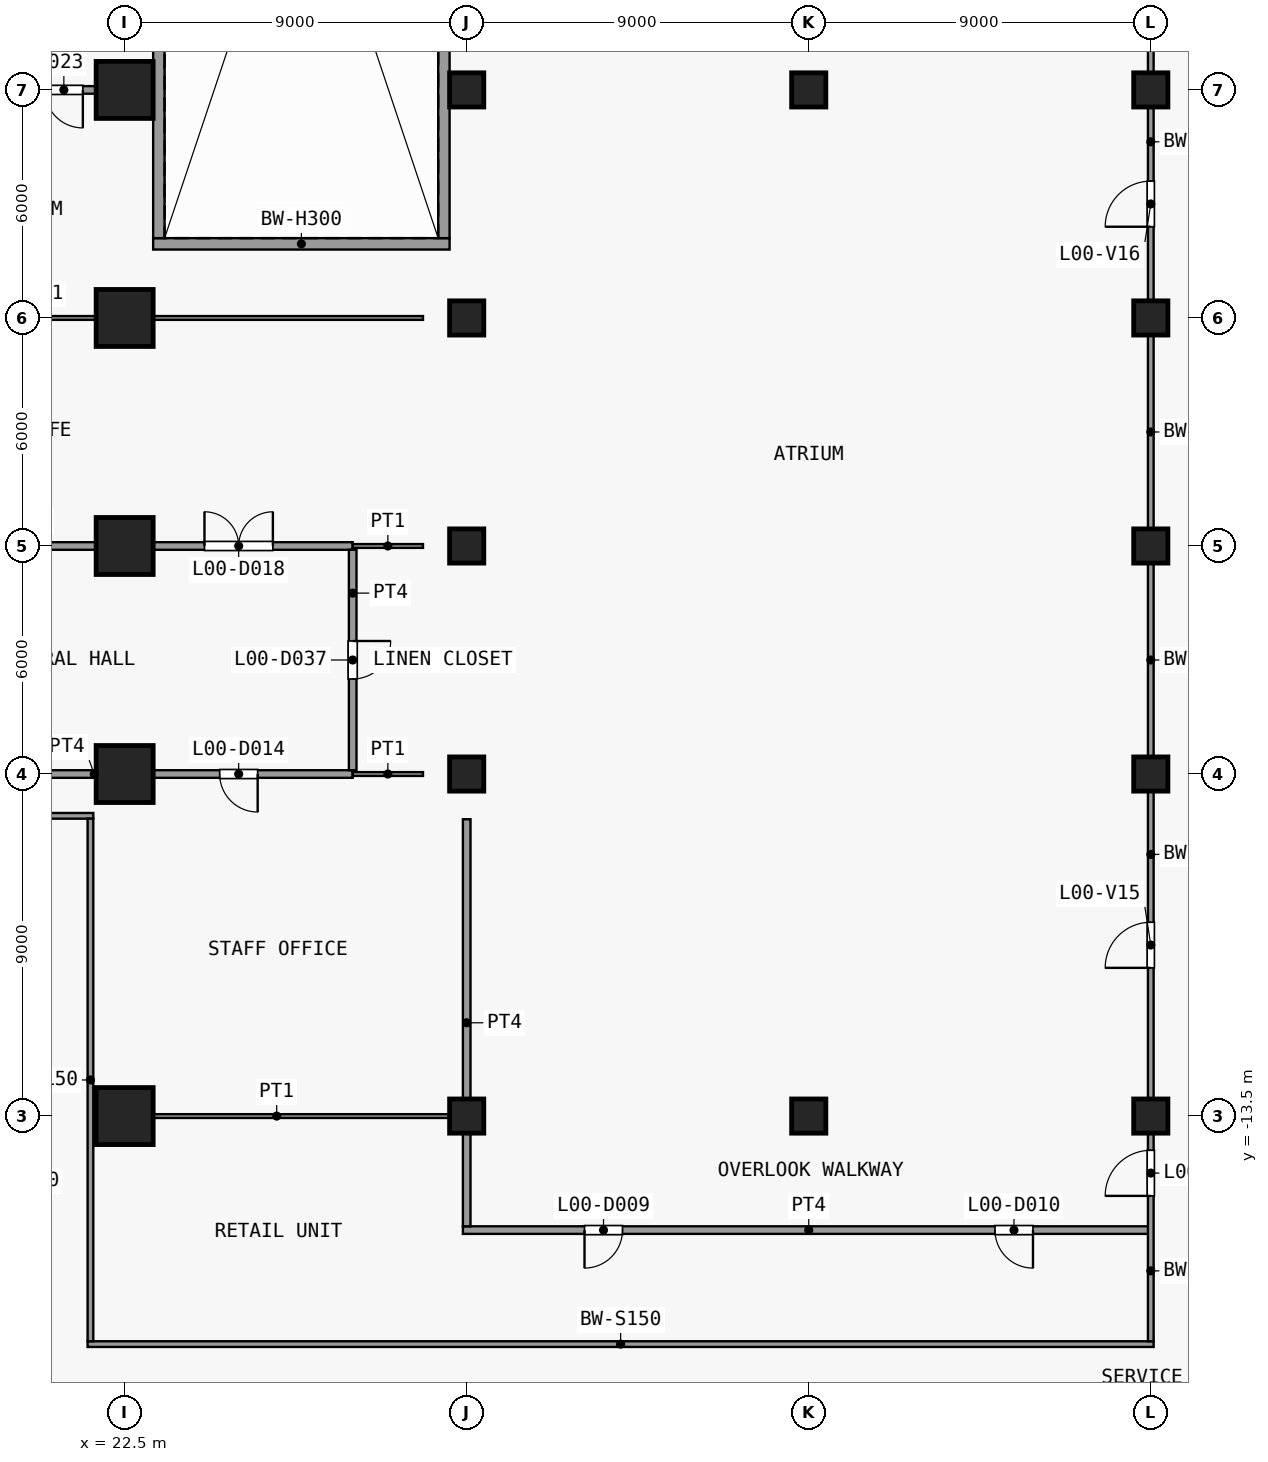
"""IFC4 building model, lengths in metres.
Left out: names, types, materials, properties, quantities, classifications, styles, units other than length and angle.
Written with IfcOpenShell. Run it as: python <this file> out.ifc"""

import sys

from ifc_helpers import new_model, si_unit, direction, frame, frame_2d, origin, origin_2d, place, context, subcontext, project, spatial, rectangle, extrude, element, fill, save


model = new_model("IFC4")
c1 = context("Model", 3, precision=1e-05, world=origin(), true_north=direction((0.0, 1.0)))
c2 = subcontext(c1, "Body", "Model", "MODEL_VIEW")
j1 = project(units=[si_unit("LENGTHUNIT", "METRE"), si_unit("PLANEANGLEUNIT", "RADIAN")], contexts=[c1])
p1 = place(None, origin())
s1 = spatial("IfcSite", under=j1, at=p1, CompositionType="ELEMENT")
p2 = place(p1, origin())
s2 = spatial("IfcBuilding", under=s1, at=p2, CompositionType="ELEMENT")
p3 = place(p2, origin())
s3 = spatial("IfcBuildingStorey", under=s2, at=p3, CompositionType="ELEMENT", Elevation=0.0)
for number, where, z_axis, x_axis in (
    (1, (22.5, -13.5, 0.0), (0.0, 0.0, 1.0), (1.0, 0.0, 0.0)),
    (2, (22.5, -4.5, 0.0), (0.0, 0.0, 1.0), (1.0, 0.0, 0.0)),
    (3, (22.5, 1.5, 0.0), (0.0, 0.0, 1.0), (1.0, 0.0, 0.0)),
    (4, (22.5, 7.5, 0.0), (0.0, 0.0, 1.0), (1.0, 0.0, 0.0)),
    (5, (22.5, 13.5, 0.0), (0.0, 0.0, 1.0), (1.0, 0.0, 0.0)),
):
    element("IfcColumn", number, at=place(p3, frame(where, z_axis=z_axis, x_axis=x_axis)), inside=s3, PredefinedType="COLUMN", context=c2, shape_type="SweptSolid", body=[
        extrude(rectangle(XDim=1.5, YDim=1.5, at=origin_2d()), origin(), (0.0, 0.0, 1.0), 8.0),
    ])
for number, where, z_axis, x_axis in (
    (6, (31.5, -13.5, 0.0), (0.0, 0.0, 1.0), (1.0, 0.0, 0.0)),
    (7, (31.5, -4.5, 0.0), (0.0, 0.0, 1.0), (1.0, 0.0, 0.0)),
    (8, (31.5, 1.5, 0.0), (0.0, 0.0, 1.0), (1.0, 0.0, 0.0)),
    (9, (31.5, 7.5, 0.0), (0.0, 0.0, 1.0), (1.0, 0.0, 0.0)),
    (10, (31.5, 13.5, 0.0), (0.0, 0.0, 1.0), (1.0, 0.0, 0.0)),
    (11, (40.5, -13.5, 0.0), (0.0, 0.0, 1.0), (1.0, 0.0, 0.0)),
    (12, (40.5, 13.5, 0.0), (0.0, 0.0, 1.0), (1.0, 0.0, 0.0)),
    (13, (49.5, -13.5, 0.0), (0.0, 0.0, 1.0), (1.0, 0.0, 0.0)),
    (14, (49.5, -4.5, 0.0), (0.0, 0.0, 1.0), (1.0, 0.0, 0.0)),
    (15, (49.5, 1.5, 0.0), (0.0, 0.0, 1.0), (1.0, 0.0, 0.0)),
    (16, (49.5, 7.5, 0.0), (0.0, 0.0, 1.0), (1.0, 0.0, 0.0)),
    (17, (49.5, 13.5, 0.0), (0.0, 0.0, 1.0), (1.0, 0.0, 0.0)),
):
    element("IfcColumn", number, at=place(p3, frame(where, z_axis=z_axis, x_axis=x_axis)), inside=s3, PredefinedType="COLUMN", context=c2, shape_type="SweptSolid", body=[
        extrude(rectangle(XDim=0.9, YDim=0.9, at=origin_2d()), origin(), (0.0, 0.0, 1.0), 8.0),
    ])
p4 = place(p3, frame((21.525, -19.5, 0.0), z_axis=(0.0, 0.0, 1.0), x_axis=(1.0, 0.0, 0.0)))
e18 = element("IfcWall", 18, at=p4, inside=s3, PredefinedType="PARTITIONING", context=c2, shape_type="SweptSolid", body=[
    extrude(rectangle(XDim=28.05, YDim=0.15, at=frame_2d((14.025, 0.0))), origin(), (0.0, 0.0, 1.0), 7.65),
])
p5 = place(p3, frame((3.825, -5.6, 0.0), z_axis=(0.0, 0.0, 1.0), x_axis=(1.0, 0.0, 0.0)))
e19 = element("IfcWall", 19, at=p5, inside=s3, PredefinedType="PARTITIONING", context=c2, shape_type="SweptSolid", body=[
    extrude(rectangle(XDim=17.85, YDim=0.15, at=frame_2d((8.925, 0.0))), origin(), (0.0, 0.0, 1.0), 7.65),
])
p6 = place(p3, frame((23.25, 9.45, 0.0), z_axis=(0.0, 0.0, 1.0), x_axis=(1.0, 0.0, 0.0)))
e20 = element("IfcWall", 20, at=p6, inside=s3, PredefinedType="SOLIDWALL", context=c2, shape_type="SweptSolid", body=[
    extrude(rectangle(XDim=7.8, YDim=0.3, at=frame_2d((3.9, 0.0))), origin(), (0.0, 0.0, 1.0), 7.65),
])
p7 = place(p3, frame((21.6, -19.425, 0.0), z_axis=(0.0, 0.0, 1.0), x_axis=(0.0, 1.0, 0.0)))
e21 = element("IfcWall", 21, at=p7, inside=s3, PredefinedType="PARTITIONING", context=c2, shape_type="SweptSolid", body=[
    extrude(rectangle(XDim=13.75, YDim=0.15, at=frame_2d((6.875, 0.0))), origin(), (0.0, 0.0, 1.0), 7.65),
])
for number, where, z_axis, x_axis in (
    (22, (23.4, 9.6, 0.0), (0.0, 0.0, 1.0), (0.0, 1.0, 0.0)),
    (23, (30.9, 9.6, 0.0), (0.0, 0.0, 1.0), (0.0, 1.0, 0.0)),
):
    element("IfcWall", number, at=place(p3, frame(where, z_axis=z_axis, x_axis=x_axis)), inside=s3, PredefinedType="SOLIDWALL", context=c2, shape_type="SweptSolid", body=[
        extrude(rectangle(XDim=24.65, YDim=0.3, at=frame_2d((12.325, 0.0))), origin(), (0.0, 0.0, 1.0), 7.65),
    ])
p8 = place(p3, frame((49.5, -19.425, 0.0), z_axis=(0.0, 0.0, 1.0), x_axis=(0.0, 1.0, 0.0)))
e24 = element("IfcWall", 24, at=p8, inside=s3, PredefinedType="PARTITIONING", context=c2, shape_type="SweptSolid", body=[
    extrude(rectangle(XDim=5.475, YDim=0.15, at=frame_2d((2.738, 0.0))), origin(), (0.0, 0.0, 1.0), 7.65),
])
p9 = place(p8, frame((3.825, 0.0, 0.0)))
e25 = element("IfcOpeningElement", 25, at=p9, cuts=e24, PredefinedType="OPENING", context=c2, shape_type="SweptSolid", body=[
    extrude(rectangle(XDim=1.2, YDim=2.1, at=frame_2d((0.6, 1.05))), frame((0.0, 0.085, 0.0), z_axis=(0.0, -1.0, 0.0), x_axis=(1.0, 0.0, 0.0)), (0.0, 0.0, 1.0), 0.17),
])
p10 = place(p3, frame((49.5, -13.05, 0.0), z_axis=(0.0, 0.0, 1.0), x_axis=(0.0, 1.0, 0.0)))
e26 = element("IfcWall", 26, at=p10, inside=s3, PredefinedType="PARTITIONING", context=c2, shape_type="SweptSolid", body=[
    extrude(rectangle(XDim=8.1, YDim=0.15, at=frame_2d((4.05, 0.0))), origin(), (0.0, 0.0, 1.0), 7.65),
])
p11 = place(p10, frame((3.45, 0.0, 0.0)))
e27 = element("IfcOpeningElement", 27, at=p11, cuts=e26, PredefinedType="OPENING", context=c2, shape_type="SweptSolid", body=[
    extrude(rectangle(XDim=1.2, YDim=2.1, at=frame_2d((0.6, 1.05))), frame((0.0, 0.085, 0.0), z_axis=(0.0, -1.0, 0.0), x_axis=(1.0, 0.0, 0.0)), (0.0, 0.0, 1.0), 0.17),
])
for number, where, z_axis, x_axis in (
    (28, (49.5, -4.05, 0.0), (0.0, 0.0, 1.0), (0.0, 1.0, 0.0)),
    (29, (49.5, 1.95, 0.0), (0.0, 0.0, 1.0), (0.0, 1.0, 0.0)),
):
    element("IfcWall", number, at=place(p3, frame(where, z_axis=z_axis, x_axis=x_axis)), inside=s3, PredefinedType="PARTITIONING", context=c2, shape_type="SweptSolid", body=[
        extrude(rectangle(XDim=5.1, YDim=0.15, at=frame_2d((2.55, 0.0))), origin(), (0.0, 0.0, 1.0), 7.65),
    ])
p12 = place(p3, frame((49.5, 7.95, 0.0), z_axis=(0.0, 0.0, 1.0), x_axis=(0.0, 1.0, 0.0)))
e30 = element("IfcWall", 30, at=p12, inside=s3, PredefinedType="PARTITIONING", context=c2, shape_type="SweptSolid", body=[
    extrude(rectangle(XDim=5.1, YDim=0.15, at=frame_2d((2.55, 0.0))), origin(), (0.0, 0.0, 1.0), 7.65),
])
p13 = place(p12, frame((1.95, 0.0, 0.0)))
e31 = element("IfcOpeningElement", 31, at=p13, cuts=e30, PredefinedType="OPENING", context=c2, shape_type="SweptSolid", body=[
    extrude(rectangle(XDim=1.2, YDim=2.1, at=frame_2d((0.6, 1.05))), frame((0.0, 0.085, 0.0), z_axis=(0.0, -1.0, 0.0), x_axis=(1.0, 0.0, 0.0)), (0.0, 0.0, 1.0), 0.17),
])
p14 = place(p3, frame((49.5, 13.95, 0.0), z_axis=(0.0, 0.0, 1.0), x_axis=(0.0, 1.0, 0.0)))
e32 = element("IfcWall", 32, at=p14, inside=s3, PredefinedType="PARTITIONING", context=c2, shape_type="SweptSolid", body=[
    extrude(rectangle(XDim=5.1, YDim=0.15, at=frame_2d((2.55, 0.0))), origin(), (0.0, 0.0, 1.0), 7.65),
])
p15 = place(p3, frame((31.4, -16.5, 0.0), z_axis=(0.0, 0.0, 1.0), x_axis=(1.0, 0.0, 0.0)))
e33 = element("IfcWall", 33, at=p15, inside=s3, PredefinedType="PARTITIONING", context=c2, shape_type="SweptSolid", body=[
    extrude(rectangle(XDim=18.1, YDim=0.2, at=frame_2d((9.05, 0.0))), origin(), (0.0, 0.0, 1.0), 7.65),
])
p16 = place(p15, frame((3.2, 0.0, 0.0)))
e34 = element("IfcOpeningElement", 34, at=p16, cuts=e33, PredefinedType="OPENING", context=c2, shape_type="SweptSolid", body=[
    extrude(rectangle(XDim=1.0, YDim=2.1, at=frame_2d((0.5, 1.05))), frame((0.0, 0.11, 0.0), z_axis=(0.0, -1.0, 0.0), x_axis=(1.0, 0.0, 0.0)), (0.0, 0.0, 1.0), 0.22),
])
p17 = place(p15, frame((14.0, 0.0, 0.0)))
e35 = element("IfcOpeningElement", 35, at=p17, cuts=e33, PredefinedType="OPENING", context=c2, shape_type="SweptSolid", body=[
    extrude(rectangle(XDim=1.0, YDim=2.1, at=frame_2d((0.5, 1.05))), frame((0.0, 0.11, 0.0), z_axis=(0.0, -1.0, 0.0), x_axis=(1.0, 0.0, 0.0)), (0.0, 0.0, 1.0), 0.22),
])
p18 = place(p3, frame((21.6, -13.5, 0.0), z_axis=(0.0, 0.0, 1.0), x_axis=(1.0, 0.0, 0.0)))
e36 = element("IfcWall", 36, at=p18, inside=s3, PredefinedType="PARTITIONING", context=c2, shape_type="SweptSolid", body=[
    extrude(rectangle(XDim=9.8, YDim=0.1, at=frame_2d((4.9, 0.0))), origin(), (0.0, 0.0, 1.0), 7.65),
])
p19 = place(p3, frame((13.4, -4.5, 0.0), z_axis=(0.0, 0.0, 1.0), x_axis=(1.0, 0.0, 0.0)))
e37 = element("IfcWall", 37, at=p19, inside=s3, PredefinedType="PARTITIONING", context=c2, shape_type="SweptSolid", body=[
    extrude(rectangle(XDim=15.1, YDim=0.2, at=frame_2d((7.55, 0.0))), origin(), (0.0, 0.0, 1.0), 7.65),
])
p20 = place(p19, frame((4.0, 0.0, 0.0)))
e38 = element("IfcOpeningElement", 38, at=p20, cuts=e37, PredefinedType="OPENING", context=c2, shape_type="SweptSolid", body=[
    extrude(rectangle(XDim=1.0, YDim=2.1, at=frame_2d((0.5, 1.05))), frame((0.0, 0.11, 0.0), z_axis=(0.0, -1.0, 0.0), x_axis=(1.0, 0.0, 0.0)), (0.0, 0.0, 1.0), 0.22),
])
p21 = place(p19, frame((11.6, 0.0, 0.0)))
e39 = element("IfcOpeningElement", 39, at=p21, cuts=e37, PredefinedType="OPENING", context=c2, shape_type="SweptSolid", body=[
    extrude(rectangle(XDim=1.0, YDim=2.1, at=frame_2d((0.5, 1.05))), frame((0.0, 0.11, 0.0), z_axis=(0.0, -1.0, 0.0), x_axis=(1.0, 0.0, 0.0)), (0.0, 0.0, 1.0), 0.22),
])
p22 = place(p3, frame((28.5, -4.5, 0.0), z_axis=(0.0, 0.0, 1.0), x_axis=(1.0, 0.0, 0.0)))
e40 = element("IfcWall", 40, at=p22, inside=s3, PredefinedType="PARTITIONING", context=c2, shape_type="SweptSolid", body=[
    extrude(rectangle(XDim=1.85, YDim=0.1, at=frame_2d((0.925, 0.0))), origin(), (0.0, 0.0, 1.0), 7.65),
])
p23 = place(p3, frame((10.5, 1.5, 0.0), z_axis=(0.0, 0.0, 1.0), x_axis=(1.0, 0.0, 0.0)))
e41 = element("IfcWall", 41, at=p23, inside=s3, PredefinedType="PARTITIONING", context=c2, shape_type="SweptSolid", body=[
    extrude(rectangle(XDim=18.0, YDim=0.2, at=frame_2d((9.0, 0.0))), origin(), (0.0, 0.0, 1.0), 7.65),
])
p24 = place(p23, frame((3.3, 0.0, 0.0)))
e42 = element("IfcOpeningElement", 42, at=p24, cuts=e41, PredefinedType="OPENING", context=c2, shape_type="SweptSolid", body=[
    extrude(rectangle(XDim=1.8, YDim=2.1, at=frame_2d((0.9, 1.05))), frame((0.0, 0.11, 0.0), z_axis=(0.0, -1.0, 0.0), x_axis=(1.0, 0.0, 0.0)), (0.0, 0.0, 1.0), 0.22),
])
p25 = place(p23, frame((14.1, 0.0, 0.0)))
e43 = element("IfcOpeningElement", 43, at=p25, cuts=e41, PredefinedType="OPENING", context=c2, shape_type="SweptSolid", body=[
    extrude(rectangle(XDim=1.8, YDim=2.1, at=frame_2d((0.9, 1.05))), frame((0.0, 0.11, 0.0), z_axis=(0.0, -1.0, 0.0), x_axis=(1.0, 0.0, 0.0)), (0.0, 0.0, 1.0), 0.22),
])
p26 = place(p3, frame((28.5, 1.5, 0.0), z_axis=(0.0, 0.0, 1.0), x_axis=(1.0, 0.0, 0.0)))
e44 = element("IfcWall", 44, at=p26, inside=s3, PredefinedType="PARTITIONING", context=c2, shape_type="SweptSolid", body=[
    extrude(rectangle(XDim=1.85, YDim=0.1, at=frame_2d((0.925, 0.0))), origin(), (0.0, 0.0, 1.0), 7.65),
])
p27 = place(p3, frame((10.5, 7.5, 0.0), z_axis=(0.0, 0.0, 1.0), x_axis=(1.0, 0.0, 0.0)))
e45 = element("IfcWall", 45, at=p27, inside=s3, PredefinedType="PARTITIONING", context=c2, shape_type="SweptSolid", body=[
    extrude(rectangle(XDim=19.85, YDim=0.1, at=frame_2d((9.925, 0.0))), origin(), (0.0, 0.0, 1.0), 7.65),
])
p28 = place(p3, frame((-31.6, 13.5, 0.0), z_axis=(0.0, 0.0, 1.0), x_axis=(1.0, 0.0, 0.0)))
e46 = element("IfcWall", 46, at=p28, inside=s3, PredefinedType="PARTITIONING", context=c2, shape_type="SweptSolid", body=[
    extrude(rectangle(XDim=54.75, YDim=0.2, at=frame_2d((27.375, 0.0))), origin(), (0.0, 0.0, 1.0), 7.65),
])
p29 = place(p28, frame((7.2, 0.0, 0.0)))
e47 = element("IfcOpeningElement", 47, at=p29, cuts=e46, PredefinedType="OPENING", context=c2, shape_type="SweptSolid", body=[
    extrude(rectangle(XDim=1.0, YDim=2.1, at=frame_2d((0.5, 1.05))), frame((0.0, 0.11, 0.0), z_axis=(0.0, -1.0, 0.0), x_axis=(1.0, 0.0, 0.0)), (0.0, 0.0, 1.0), 0.22),
])
p30 = place(p28, frame((34.2, 0.0, 0.0)))
e48 = element("IfcOpeningElement", 48, at=p30, cuts=e46, PredefinedType="OPENING", context=c2, shape_type="SweptSolid", body=[
    extrude(rectangle(XDim=1.0, YDim=2.1, at=frame_2d((0.5, 1.05))), frame((0.0, 0.11, 0.0), z_axis=(0.0, -1.0, 0.0), x_axis=(1.0, 0.0, 0.0)), (0.0, 0.0, 1.0), 0.22),
])
p31 = place(p28, frame((45.3, 0.0, 0.0)))
e49 = element("IfcOpeningElement", 49, at=p31, cuts=e46, PredefinedType="OPENING", context=c2, shape_type="SweptSolid", body=[
    extrude(rectangle(XDim=1.0, YDim=2.1, at=frame_2d((0.5, 1.05))), frame((0.0, 0.11, 0.0), z_axis=(0.0, -1.0, 0.0), x_axis=(1.0, 0.0, 0.0)), (0.0, 0.0, 1.0), 0.22),
])
p32 = place(p28, frame((52.0, 0.0, 0.0)))
e50 = element("IfcOpeningElement", 50, at=p32, cuts=e46, PredefinedType="OPENING", context=c2, shape_type="SweptSolid", body=[
    extrude(rectangle(XDim=1.0, YDim=2.1, at=frame_2d((0.5, 1.05))), frame((0.0, 0.11, 0.0), z_axis=(0.0, -1.0, 0.0), x_axis=(1.0, 0.0, 0.0)), (0.0, 0.0, 1.0), 0.22),
])
p33 = place(p3, frame((28.5, -4.4, 0.0), z_axis=(0.0, 0.0, 1.0), x_axis=(0.0, 1.0, 0.0)))
e51 = element("IfcWall", 51, at=p33, inside=s3, PredefinedType="PARTITIONING", context=c2, shape_type="SweptSolid", body=[
    extrude(rectangle(XDim=5.8, YDim=0.2, at=frame_2d((2.9, 0.0))), origin(), (0.0, 0.0, 1.0), 7.65),
])
p34 = place(p33, frame((2.4, 0.0, 0.0)))
e52 = element("IfcOpeningElement", 52, at=p34, cuts=e51, PredefinedType="OPENING", context=c2, shape_type="SweptSolid", body=[
    extrude(rectangle(XDim=1.0, YDim=2.1, at=frame_2d((0.5, 1.05))), frame((0.0, 0.11, 0.0), z_axis=(0.0, -1.0, 0.0), x_axis=(1.0, 0.0, 0.0)), (0.0, 0.0, 1.0), 0.22),
])
p35 = place(p3, frame((31.5, -16.4, 0.0), z_axis=(0.0, 0.0, 1.0), x_axis=(0.0, 1.0, 0.0)))
e53 = element("IfcWall", 53, at=p35, inside=s3, PredefinedType="PARTITIONING", context=c2, shape_type="SweptSolid", body=[
    extrude(rectangle(XDim=10.71, YDim=0.2, at=frame_2d((5.355, 0.0))), origin(), (0.0, 0.0, 1.0), 7.65),
])
p36 = place(p9, origin())
e54 = element("IfcDoor", 54, at=p36, inside=s3, OperationType="SINGLE_SWING_LEFT", PredefinedType="DOOR", context=c2, shape_type="SweptSolid", body=[
    extrude(rectangle(XDim=1.2, YDim=2.1, at=frame_2d((0.6, 1.05))), frame((0.0, 0.025, 0.0), z_axis=(0.0, -1.0, 0.0), x_axis=(1.0, 0.0, 0.0)), (0.0, 0.0, 1.0), 0.05),
])
fill(e25, e54)
p37 = place(p11, origin())
e55 = element("IfcDoor", 55, at=p37, inside=s3, OperationType="SINGLE_SWING_LEFT", PredefinedType="DOOR", context=c2, shape_type="SweptSolid", body=[
    extrude(rectangle(XDim=1.2, YDim=2.1, at=frame_2d((0.6, 1.05))), frame((0.0, 0.025, 0.0), z_axis=(0.0, -1.0, 0.0), x_axis=(1.0, 0.0, 0.0)), (0.0, 0.0, 1.0), 0.05),
])
fill(e27, e55)
p38 = place(p13, origin())
e56 = element("IfcDoor", 56, at=p38, inside=s3, OperationType="SINGLE_SWING_LEFT", PredefinedType="DOOR", context=c2, shape_type="SweptSolid", body=[
    extrude(rectangle(XDim=1.2, YDim=2.1, at=frame_2d((0.6, 1.05))), frame((0.0, 0.025, 0.0), z_axis=(0.0, -1.0, 0.0), x_axis=(1.0, 0.0, 0.0)), (0.0, 0.0, 1.0), 0.05),
])
fill(e31, e56)
p39 = place(p16, origin())
e57 = element("IfcDoor", 57, at=p39, inside=s3, OperationType="SINGLE_SWING_LEFT", PredefinedType="DOOR", context=c2, shape_type="SweptSolid", body=[
    extrude(rectangle(XDim=1.0, YDim=2.1, at=frame_2d((0.5, 1.05))), frame((0.0, 0.025, 0.0), z_axis=(0.0, -1.0, 0.0), x_axis=(1.0, 0.0, 0.0)), (0.0, 0.0, 1.0), 0.05),
])
fill(e34, e57)
p40 = place(p17, origin())
e58 = element("IfcDoor", 58, at=p40, inside=s3, OperationType="SINGLE_SWING_RIGHT", PredefinedType="DOOR", context=c2, shape_type="SweptSolid", body=[
    extrude(rectangle(XDim=1.0, YDim=2.1, at=frame_2d((0.5, 1.05))), frame((0.0, 0.025, 0.0), z_axis=(0.0, -1.0, 0.0), x_axis=(1.0, 0.0, 0.0)), (0.0, 0.0, 1.0), 0.05),
])
fill(e35, e58)
p41 = place(p21, origin())
e59 = element("IfcDoor", 59, at=p41, inside=s3, OperationType="SINGLE_SWING_RIGHT", PredefinedType="DOOR", context=c2, shape_type="SweptSolid", body=[
    extrude(rectangle(XDim=1.0, YDim=2.1, at=frame_2d((0.5, 1.05))), frame((0.0, 0.025, 0.0), z_axis=(0.0, -1.0, 0.0), x_axis=(1.0, 0.0, 0.0)), (0.0, 0.0, 1.0), 0.05),
])
fill(e39, e59)
p42 = place(p25, origin())
e60 = element("IfcDoor", 60, at=p42, inside=s3, OperationType="DOUBLE_DOOR_SINGLE_SWING", PredefinedType="DOOR", context=c2, shape_type="SweptSolid", body=[
    extrude(rectangle(XDim=1.8, YDim=2.1, at=frame_2d((0.9, 1.05))), frame((0.0, 0.025, 0.0), z_axis=(0.0, -1.0, 0.0), x_axis=(1.0, 0.0, 0.0)), (0.0, 0.0, 1.0), 0.05),
])
fill(e43, e60)
p43 = place(p32, origin())
e61 = element("IfcDoor", 61, at=p43, inside=s3, OperationType="SINGLE_SWING_RIGHT", PredefinedType="DOOR", context=c2, shape_type="SweptSolid", body=[
    extrude(rectangle(XDim=1.0, YDim=2.1, at=frame_2d((0.5, 1.05))), frame((0.0, 0.025, 0.0), z_axis=(0.0, -1.0, 0.0), x_axis=(1.0, 0.0, 0.0)), (0.0, 0.0, 1.0), 0.05),
])
fill(e50, e61)
p44 = place(p34, origin())
e62 = element("IfcDoor", 62, at=p44, inside=s3, OperationType="SINGLE_SWING_RIGHT", PredefinedType="DOOR", context=c2, shape_type="SweptSolid", body=[
    extrude(rectangle(XDim=1.0, YDim=2.1, at=frame_2d((0.5, 1.05))), frame((0.0, 0.025, 0.0), z_axis=(0.0, -1.0, 0.0), x_axis=(1.0, 0.0, 0.0)), (0.0, 0.0, 1.0), 0.05),
])
fill(e52, e62)
save(model, sys.argv[1])
